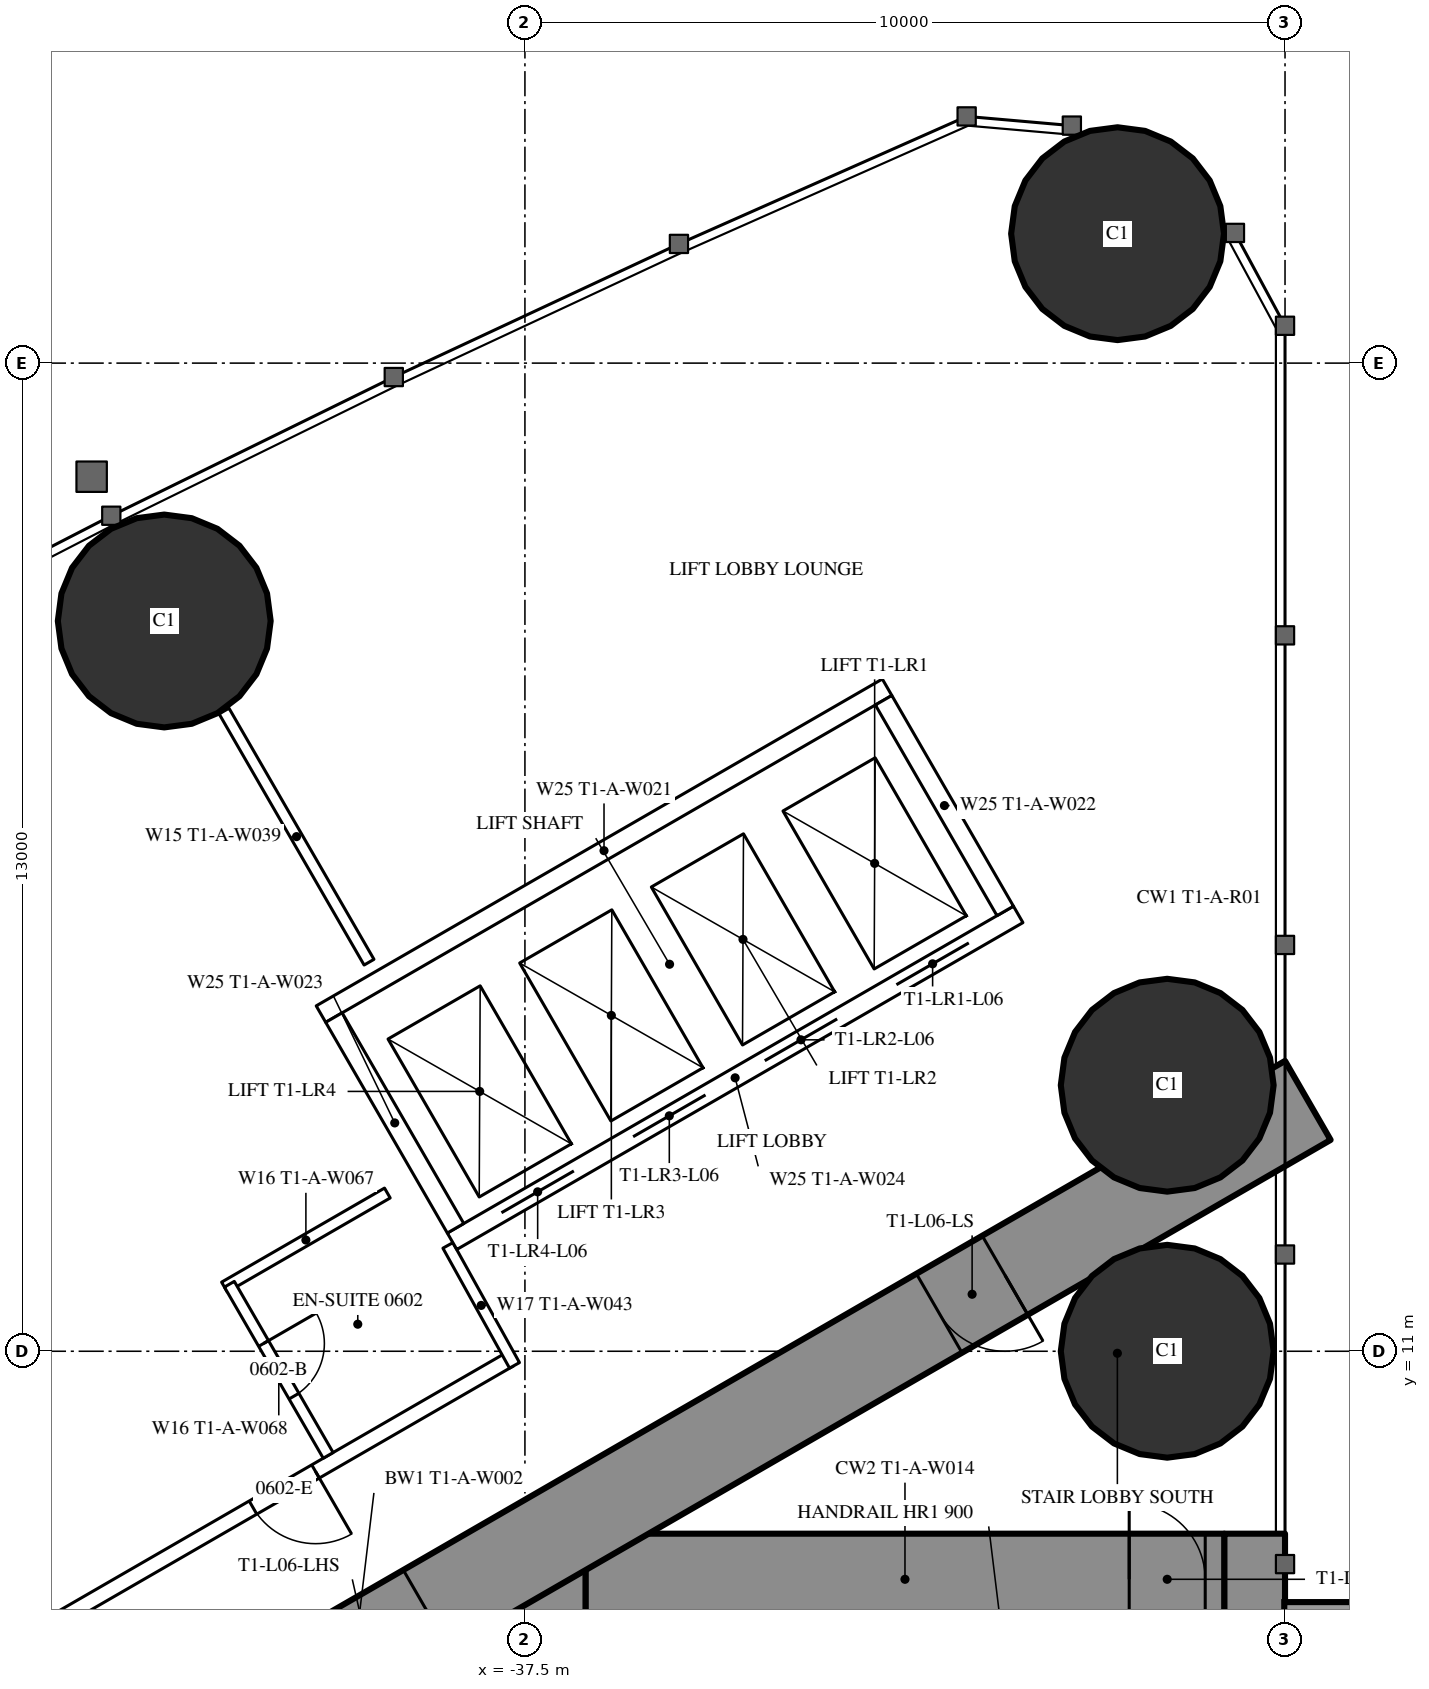
"""IFC4 building model, lengths in metres.
Left out: names, types, materials, properties, quantities, classifications, styles, units other than length and angle.
Written with IfcOpenShell. Run it as: python <this file> out.ifc"""

import sys

from ifc_helpers import new_model, si_unit, direction, frame, frame_2d, origin, origin_2d, place, context, subcontext, project, spatial, rectangle, hollow_circle, extrude, element, fill, save


model = new_model("IFC4")
c1 = context("Model", 3, precision=1e-05, world=origin(), true_north=direction((0.0, 1.0)))
c2 = subcontext(c1, "Body", "Model", "MODEL_VIEW")
j1 = project(units=[si_unit("LENGTHUNIT", "METRE"), si_unit("PLANEANGLEUNIT", "RADIAN")], contexts=[c1])
p1 = place(None, origin())
s1 = spatial("IfcSite", under=j1, at=p1, CompositionType="ELEMENT")
p2 = place(p1, origin())
s2 = spatial("IfcBuilding", under=s1, at=p2, CompositionType="ELEMENT")
p3 = place(p2, frame((0.0, 0.0, 28.5)))
s3 = spatial("IfcBuildingStorey", under=s2, at=p3, CompositionType="ELEMENT", Elevation=28.5)
for number, where, z_axis, x_axis in (
    (1, (-29.703, 25.703, 0.0), (0.0, 0.0, 1.0), (1.0, 0.0, 0.0)),
    (2, (-29.05, 11.0, 0.0), (0.0, 0.0, 1.0), (1.0, 0.0, 0.0)),
    (3, (-29.05, 14.5, 0.0), (0.0, 0.0, 1.0), (1.0, 0.0, 0.0)),
    (4, (-42.245, 20.607, 0.0), (0.0, 0.0, 1.0), (1.0, 0.0, 0.0)),
):
    element("IfcColumn", number, at=place(p3, frame(where, z_axis=z_axis, x_axis=x_axis)), inside=s3, PredefinedType="COLUMN", context=c2, shape_type="SweptSolid", body=[
        extrude(hollow_circle(Radius=1.4, WallThickness=0.12, at=origin_2d()), origin(), (0.0, 0.0, 1.0), 3.5),
    ])
p4 = place(p3, frame((-27.9, 8.6, 0.0), z_axis=(0.0, 0.0, 1.0), x_axis=(0.0, -1.0, 0.0)))
e5 = element("IfcWall", 5, at=p4, inside=s3, PredefinedType="SHEAR", context=c2, shape_type="SweptSolid", body=[
    extrude(rectangle(XDim=17.2, YDim=0.8, at=frame_2d((8.6, 0.0))), origin(), (0.0, 0.0, 1.0), 3.5),
])
p5 = place(p4, frame((2.45, 0.0, 0.6)))
e6 = element("IfcOpeningElement", 6, at=p5, cuts=e5, PredefinedType="OPENING", context=c2, shape_type="SweptSolid", body=[
    extrude(rectangle(XDim=0.6, YDim=2.1, at=frame_2d((0.3, 1.05))), frame((0.0, 0.41, 0.0), z_axis=(0.0, -1.0, 0.0), x_axis=(1.0, 0.0, 0.0)), (0.0, 0.0, 1.0), 0.82),
])
p6 = place(p4, frame((14.15, 0.0, 0.6)))
e7 = element("IfcOpeningElement", 7, at=p6, cuts=e5, PredefinedType="OPENING", context=c2, shape_type="SweptSolid", body=[
    extrude(rectangle(XDim=0.6, YDim=2.1, at=frame_2d((0.3, 1.05))), frame((0.0, 0.41, 0.0), z_axis=(0.0, -1.0, 0.0), x_axis=(1.0, 0.0, 0.0)), (0.0, 0.0, 1.0), 0.82),
])
p7 = place(p3, frame((-37.3, 8.6, 0.0), z_axis=(0.0, 0.0, 1.0), x_axis=(0.0, -1.0, 0.0)))
e8 = element("IfcWall", 8, at=p7, inside=s3, PredefinedType="SHEAR", context=c2, shape_type="SweptSolid", body=[
    extrude(rectangle(XDim=17.2, YDim=1.2, at=frame_2d((8.6, 0.0))), origin(), (0.0, 0.0, 1.0), 3.5),
])
p8 = place(p7, frame((7.7, 0.0, 0.0)))
e9 = element("IfcOpeningElement", 9, at=p8, cuts=e8, PredefinedType="OPENING", context=c2, shape_type="SweptSolid", body=[
    extrude(rectangle(XDim=1.8, YDim=2.2, at=frame_2d((0.9, 1.1))), frame((0.0, 0.61, 0.0), z_axis=(0.0, -1.0, 0.0), x_axis=(1.0, 0.0, 0.0)), (0.0, 0.0, 1.0), 1.22),
])
p9 = place(p3, frame((-28.3, 8.0, 0.0), z_axis=(0.0, 0.0, 1.0), x_axis=(-1.0, 0.0, 0.0)))
e10 = element("IfcWall", 10, at=p9, inside=s3, PredefinedType="SHEAR", context=c2, shape_type="SweptSolid", body=[
    extrude(rectangle(XDim=8.4, YDim=1.2, at=frame_2d((4.2, 0.0))), origin(), (0.0, 0.0, 1.0), 3.5),
])
p10 = place(p9, frame((0.25, 0.0, 0.0)))
e11 = element("IfcOpeningElement", 11, at=p10, cuts=e10, PredefinedType="OPENING", context=c2, shape_type="SweptSolid", body=[
    extrude(rectangle(XDim=1.0, YDim=2.2, at=frame_2d((0.5, 1.1))), frame((0.0, 0.61, 0.0), z_axis=(0.0, -1.0, 0.0), x_axis=(1.0, 0.0, 0.0)), (0.0, 0.0, 1.0), 1.22),
])
p11 = place(p3, frame((-27.2, 14.3, 0.0), z_axis=(0.0, 0.0, 1.0), x_axis=(-0.866026593062, -0.499997940104, 0.0)))
e12 = element("IfcWall", 12, at=p11, inside=s3, PredefinedType="SHEAR", context=c2, shape_type="SweptSolid", body=[
    extrude(rectangle(XDim=28.946, YDim=1.2, at=frame_2d((14.473, 0.0))), origin(), (0.0, 0.0, 1.0), 3.5),
])
p12 = place(p11, frame((4.6, 0.0, 0.0)))
e13 = element("IfcOpeningElement", 13, at=p12, cuts=e12, PredefinedType="OPENING", context=c2, shape_type="SweptSolid", body=[
    extrude(rectangle(XDim=1.0, YDim=2.2, at=frame_2d((0.5, 1.1))), frame((0.0, 0.61, 0.0), z_axis=(0.0, -1.0, 0.0), x_axis=(1.0, 0.0, 0.0)), (0.0, 0.0, 1.0), 1.22),
])
p13 = place(p11, frame((13.395, 0.0, 0.0)))
e14 = element("IfcOpeningElement", 14, at=p13, cuts=e12, PredefinedType="OPENING", context=c2, shape_type="SweptSolid", body=[
    extrude(rectangle(XDim=1.8, YDim=2.2, at=frame_2d((0.9, 1.1))), frame((0.0, 0.61, 0.0), z_axis=(0.0, -1.0, 0.0), x_axis=(1.0, 0.0, 0.0)), (0.0, 0.0, 1.0), 1.22),
])
p14 = place(p3, frame((-39.551, 16.119, 0.0), z_axis=(0.0, 0.0, 1.0), x_axis=(-0.500014214979, 0.866017196607, 0.0)))
e15 = element("IfcWall", 15, at=p14, inside=s3, PredefinedType="PARTITIONING", context=c2, shape_type="SweptSolid", body=[
    extrude(rectangle(XDim=3.815, YDim=0.15, at=frame_2d((1.907, 0.0))), origin(), (0.0, 0.0, 1.0), 3.25),
])
p15 = place(p3, frame((-37.7, 10.894, 0.0), z_axis=(0.0, 0.0, 1.0), x_axis=(-0.866027905338, -0.499995667157, 0.0)))
e16 = element("IfcWall", 16, at=p15, inside=s3, PredefinedType="PARTITIONING", context=c2, shape_type="SweptSolid", body=[
    extrude(rectangle(XDim=21.787, YDim=0.2, at=frame_2d((10.894, 0.0))), origin(), (0.0, 0.0, 1.0), 3.25),
])
p16 = place(p15, frame((16.008, 0.0, 0.0)))
e17 = element("IfcOpeningElement", 17, at=p16, cuts=e16, PredefinedType="OPENING", context=c2, shape_type="SweptSolid", body=[
    extrude(rectangle(XDim=0.95, YDim=2.2, at=frame_2d((0.475, 1.1))), frame((0.0, 0.11, 0.0), z_axis=(0.0, -1.0, 0.0), x_axis=(1.0, 0.0, 0.0)), (0.0, 0.0, 1.0), 0.22),
])
p17 = place(p15, frame((20.058, 0.0, 0.0)))
e18 = element("IfcOpeningElement", 18, at=p17, cuts=e16, PredefinedType="OPENING", context=c2, shape_type="SweptSolid", body=[
    extrude(rectangle(XDim=0.95, YDim=2.2, at=frame_2d((0.475, 1.1))), frame((0.0, 0.11, 0.0), z_axis=(0.0, -1.0, 0.0), x_axis=(1.0, 0.0, 0.0)), (0.0, 0.0, 1.0), 0.22),
])
p18 = place(p15, frame((2.95, 0.0, 0.0)))
e19 = element("IfcOpeningElement", 19, at=p18, cuts=e16, PredefinedType="OPENING", context=c2, shape_type="SweptSolid", body=[
    extrude(rectangle(XDim=0.95, YDim=2.2, at=frame_2d((0.475, 1.1))), frame((0.0, 0.11, 0.0), z_axis=(0.0, -1.0, 0.0), x_axis=(1.0, 0.0, 0.0)), (0.0, 0.0, 1.0), 0.22),
])
p19 = place(p3, frame((-38.513, 12.392, 0.0), z_axis=(0.0, 0.0, 1.0), x_axis=(0.485585508183, -0.874189175317, 0.0)))
e20 = element("IfcWall", 20, at=p19, inside=s3, PredefinedType="PARTITIONING", context=c2, shape_type="SweptSolid", body=[
    extrude(rectangle(XDim=1.805, YDim=0.15, at=frame_2d((0.902, 0.0))), origin(), (0.0, 0.0, 1.0), 3.25),
])
p20 = place(p3, frame((-39.31, 13.082, 0.0), z_axis=(0.0, 0.0, 1.0), x_axis=(-0.866031185235, -0.4999899861, 0.0)))
e21 = element("IfcWall", 21, at=p20, inside=s3, PredefinedType="PARTITIONING", context=c2, shape_type="SweptSolid", body=[
    extrude(rectangle(XDim=2.475, YDim=0.15, at=frame_2d((1.238, 0.0))), origin(), (0.0, 0.0, 1.0), 3.25),
])
p21 = place(p3, frame((-40.088, 9.63, 0.0), z_axis=(0.0, 0.0, 1.0), x_axis=(-0.500006934395, 0.866021400173, 0.0)))
e22 = element("IfcWall", 22, at=p21, inside=s3, PredefinedType="PARTITIONING", context=c2, shape_type="SweptSolid", body=[
    extrude(rectangle(XDim=2.6, YDim=0.15, at=frame_2d((1.3, 0.0))), origin(), (0.0, 0.0, 1.0), 3.25),
])
p22 = place(p21, frame((0.9, 0.0, 0.0)))
e23 = element("IfcOpeningElement", 23, at=p22, cuts=e22, PredefinedType="OPENING", context=c2, shape_type="SweptSolid", body=[
    extrude(rectangle(XDim=0.8, YDim=2.2, at=frame_2d((0.4, 1.1))), frame((0.0, 0.085, 0.0), z_axis=(0.0, -1.0, 0.0), x_axis=(1.0, 0.0, 0.0)), (0.0, 0.0, 1.0), 0.17),
])
p23 = place(p3, frame((-31.01, 16.747, 0.0), z_axis=(0.0, 0.0, 1.0), x_axis=(-0.866028165386, -0.499995216735, 0.0)))
e24 = element("IfcWall", 24, at=p23, inside=s3, PredefinedType="PARTITIONING", context=c2, shape_type="SweptSolid", body=[
    extrude(rectangle(XDim=8.6, YDim=0.25, at=frame_2d((4.3, 0.0))), origin(), (0.0, 0.0, 1.0), 3.25),
])
p24 = place(p23, frame((0.75, 0.0, 0.0)))
e25 = element("IfcOpeningElement", 25, at=p24, cuts=e24, PredefinedType="OPENING", context=c2, shape_type="SweptSolid", body=[
    extrude(rectangle(XDim=1.1, YDim=2.2, at=frame_2d((0.55, 1.1))), frame((0.0, 0.135, 0.0), z_axis=(0.0, -1.0, 0.0), x_axis=(1.0, 0.0, 0.0)), (0.0, 0.0, 1.0), 0.27),
])
p25 = place(p23, frame((2.75, 0.0, 0.0)))
e26 = element("IfcOpeningElement", 26, at=p25, cuts=e24, PredefinedType="OPENING", context=c2, shape_type="SweptSolid", body=[
    extrude(rectangle(XDim=1.1, YDim=2.2, at=frame_2d((0.55, 1.1))), frame((0.0, 0.135, 0.0), z_axis=(0.0, -1.0, 0.0), x_axis=(1.0, 0.0, 0.0)), (0.0, 0.0, 1.0), 0.27),
])
p26 = place(p23, frame((4.75, 0.0, 0.0)))
e27 = element("IfcOpeningElement", 27, at=p26, cuts=e24, PredefinedType="OPENING", context=c2, shape_type="SweptSolid", body=[
    extrude(rectangle(XDim=1.1, YDim=2.2, at=frame_2d((0.55, 1.1))), frame((0.0, 0.135, 0.0), z_axis=(0.0, -1.0, 0.0), x_axis=(1.0, 0.0, 0.0)), (0.0, 0.0, 1.0), 0.27),
])
p27 = place(p23, frame((6.75, 0.0, 0.0)))
e28 = element("IfcOpeningElement", 28, at=p27, cuts=e24, PredefinedType="OPENING", context=c2, shape_type="SweptSolid", body=[
    extrude(rectangle(XDim=1.1, YDim=2.2, at=frame_2d((0.55, 1.1))), frame((0.0, 0.135, 0.0), z_axis=(0.0, -1.0, 0.0), x_axis=(1.0, 0.0, 0.0)), (0.0, 0.0, 1.0), 0.27),
])
p28 = place(p3, frame((-32.736, 19.736, 0.0), z_axis=(0.0, 0.0, 1.0), x_axis=(-0.866028165386, -0.499995216735, 0.0)))
e29 = element("IfcWall", 29, at=p28, inside=s3, PredefinedType="PARTITIONING", context=c2, shape_type="SweptSolid", body=[
    extrude(rectangle(XDim=8.6, YDim=0.25, at=frame_2d((4.3, 0.0))), origin(), (0.0, 0.0, 1.0), 3.25),
])
p29 = place(p3, frame((-31.181, 16.793, 0.0), z_axis=(0.0, 0.0, 1.0), x_axis=(-0.499929347863, 0.866066190972, 0.0)))
e30 = element("IfcWall", 30, at=p29, inside=s3, PredefinedType="PARTITIONING", context=c2, shape_type="SweptSolid", body=[
    extrude(rectangle(XDim=3.201, YDim=0.25, at=frame_2d((1.6, 0.0))), origin(), (0.0, 0.0, 1.0), 3.25),
])
p30 = place(p3, frame((-38.413, 12.618, 0.0), z_axis=(0.0, 0.0, 1.0), x_axis=(-0.499872130319, 0.866099216793, 0.0)))
e31 = element("IfcWall", 31, at=p30, inside=s3, PredefinedType="PARTITIONING", context=c2, shape_type="SweptSolid", body=[
    extrude(rectangle(XDim=3.2, YDim=0.25, at=frame_2d((1.6, 0.0))), origin(), (0.0, 0.0, 1.0), 3.25),
])
p31 = place(p22, origin())
e32 = element("IfcDoor", 32, at=p31, inside=s3, OperationType="SINGLE_SWING_RIGHT", PredefinedType="DOOR", context=c2, shape_type="SweptSolid", body=[
    extrude(rectangle(XDim=0.8, YDim=2.2, at=frame_2d((0.4, 1.1))), frame((0.0, 0.025, 0.0), z_axis=(0.0, -1.0, 0.0), x_axis=(1.0, 0.0, 0.0)), (0.0, 0.0, 1.0), 0.05),
])
fill(e23, e32)
p32 = place(p18, origin())
e33 = element("IfcDoor", 33, at=p32, inside=s3, OperationType="SINGLE_SWING_LEFT", PredefinedType="DOOR", context=c2, shape_type="SweptSolid", body=[
    extrude(rectangle(XDim=0.95, YDim=2.2, at=frame_2d((0.475, 1.1))), frame((0.0, 0.025, 0.0), z_axis=(0.0, -1.0, 0.0), x_axis=(1.0, 0.0, 0.0)), (0.0, 0.0, 1.0), 0.05),
])
fill(e19, e33)
p33 = place(p12, origin())
e34 = element("IfcDoor", 34, at=p33, inside=s3, OperationType="SINGLE_SWING_LEFT", PredefinedType="DOOR", context=c2, shape_type="SweptSolid", body=[
    extrude(rectangle(XDim=1.0, YDim=2.2, at=frame_2d((0.5, 1.1))), frame((0.0, 0.025, 0.0), z_axis=(0.0, -1.0, 0.0), x_axis=(1.0, 0.0, 0.0)), (0.0, 0.0, 1.0), 0.05),
])
fill(e13, e34)
p34 = place(p13, origin())
e35 = element("IfcDoor", 35, at=p34, inside=s3, OperationType="DOUBLE_DOOR_SINGLE_SWING", PredefinedType="DOOR", context=c2, shape_type="SweptSolid", body=[
    extrude(rectangle(XDim=1.8, YDim=2.2, at=frame_2d((0.9, 1.1))), frame((0.0, 0.025, 0.0), z_axis=(0.0, -1.0, 0.0), x_axis=(1.0, 0.0, 0.0)), (0.0, 0.0, 1.0), 0.05),
])
fill(e14, e35)
p35 = place(p10, origin())
e36 = element("IfcDoor", 36, at=p35, inside=s3, OperationType="SINGLE_SWING_RIGHT", PredefinedType="DOOR", context=c2, shape_type="SweptSolid", body=[
    extrude(rectangle(XDim=1.0, YDim=2.2, at=frame_2d((0.5, 1.1))), frame((0.0, 0.025, 0.0), z_axis=(0.0, -1.0, 0.0), x_axis=(1.0, 0.0, 0.0)), (0.0, 0.0, 1.0), 0.05),
])
fill(e11, e36)
p36 = place(p24, origin())
e37 = element("IfcDoor", 37, at=p36, inside=s3, OperationType="DOUBLE_DOOR_SLIDING", PredefinedType="USERDEFINED", context=c2, shape_type="SweptSolid", body=[
    extrude(rectangle(XDim=1.1, YDim=2.2, at=frame_2d((0.55, 1.1))), frame((0.0, 0.025, 0.0), z_axis=(0.0, -1.0, 0.0), x_axis=(1.0, 0.0, 0.0)), (0.0, 0.0, 1.0), 0.05),
])
fill(e25, e37)
p37 = place(p25, origin())
e38 = element("IfcDoor", 38, at=p37, inside=s3, OperationType="DOUBLE_DOOR_SLIDING", PredefinedType="USERDEFINED", context=c2, shape_type="SweptSolid", body=[
    extrude(rectangle(XDim=1.1, YDim=2.2, at=frame_2d((0.55, 1.1))), frame((0.0, 0.025, 0.0), z_axis=(0.0, -1.0, 0.0), x_axis=(1.0, 0.0, 0.0)), (0.0, 0.0, 1.0), 0.05),
])
fill(e26, e38)
p38 = place(p26, origin())
e39 = element("IfcDoor", 39, at=p38, inside=s3, OperationType="DOUBLE_DOOR_SLIDING", PredefinedType="USERDEFINED", context=c2, shape_type="SweptSolid", body=[
    extrude(rectangle(XDim=1.1, YDim=2.2, at=frame_2d((0.55, 1.1))), frame((0.0, 0.025, 0.0), z_axis=(0.0, -1.0, 0.0), x_axis=(1.0, 0.0, 0.0)), (0.0, 0.0, 1.0), 0.05),
])
fill(e27, e39)
p39 = place(p27, origin())
e40 = element("IfcDoor", 40, at=p39, inside=s3, OperationType="DOUBLE_DOOR_SLIDING", PredefinedType="USERDEFINED", context=c2, shape_type="SweptSolid", body=[
    extrude(rectangle(XDim=1.1, YDim=2.2, at=frame_2d((0.55, 1.1))), frame((0.0, 0.025, 0.0), z_axis=(0.0, -1.0, 0.0), x_axis=(1.0, 0.0, 0.0)), (0.0, 0.0, 1.0), 0.05),
])
fill(e28, e40)
save(model, sys.argv[1])
